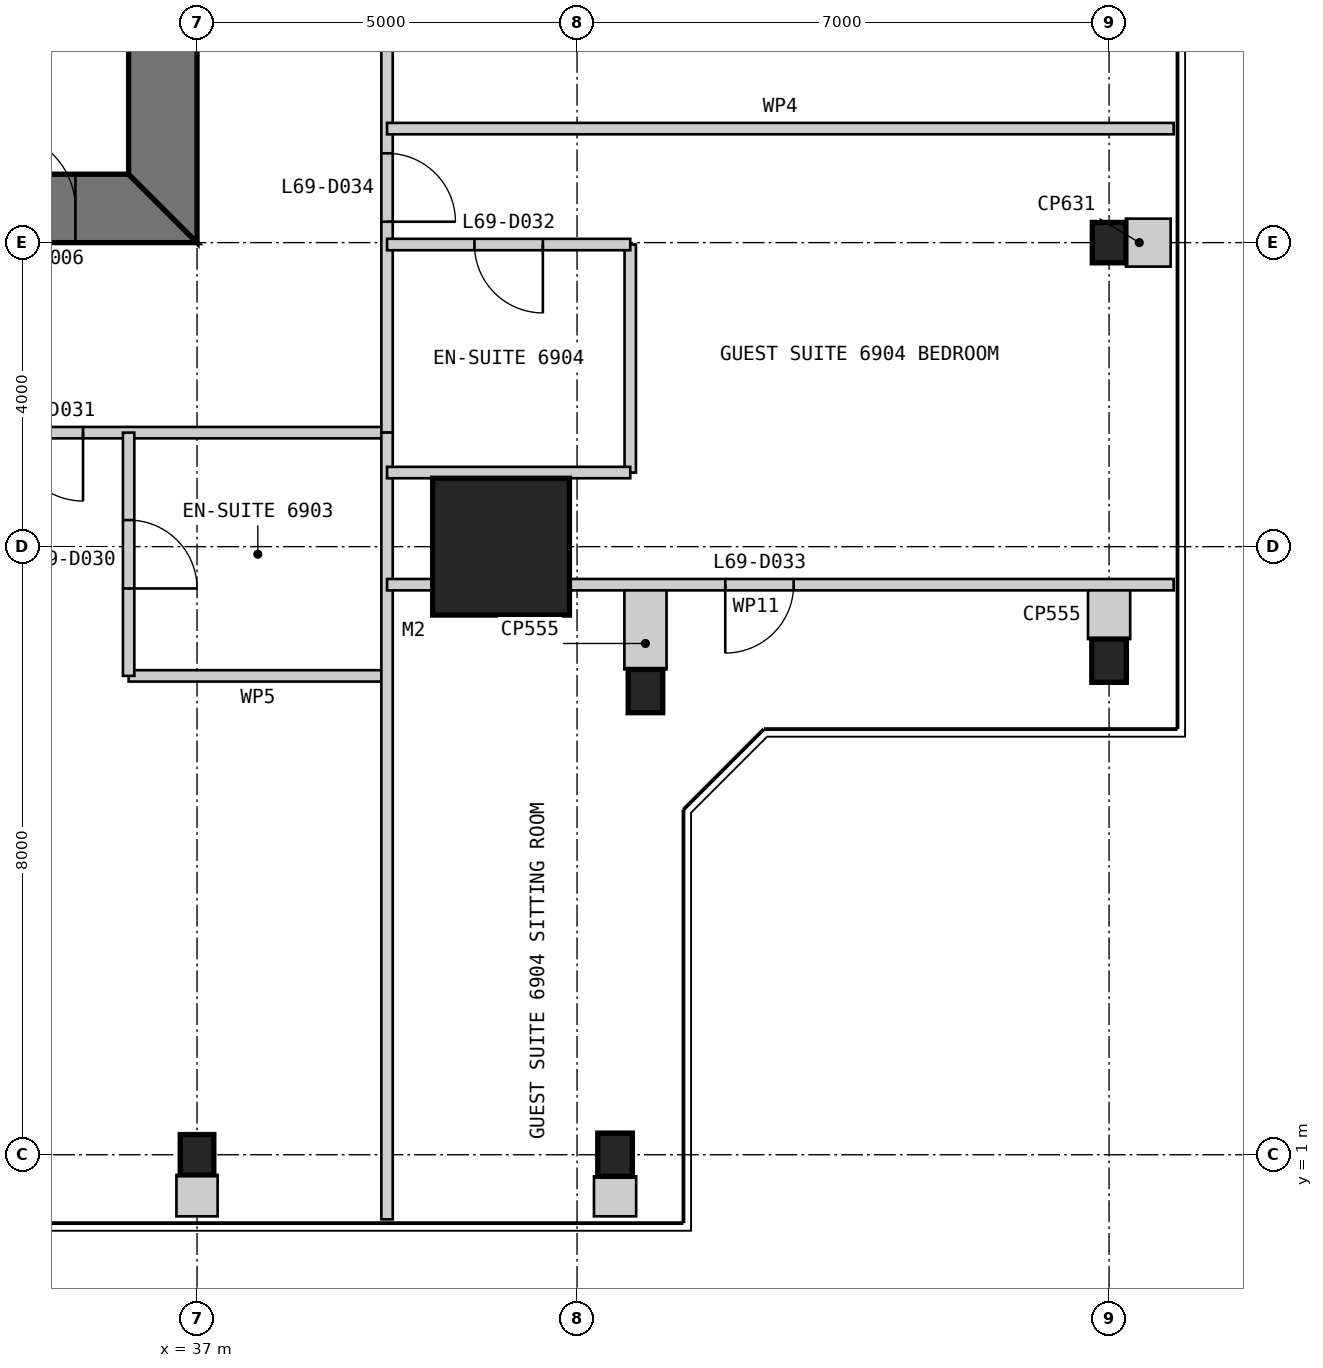
"""IFC4 building model, lengths in metres.
Left out: names, types, materials, properties, quantities, classifications, styles, units other than length and angle.
Written with IfcOpenShell. Run it as: python <this file> out.ifc"""

import sys

from ifc_helpers import new_model, si_unit, direction, frame, frame_2d, origin, origin_2d, place, context, subcontext, project, spatial, polyline, rectangle, i_section, outline, extrude, element, fill, save


model = new_model("IFC4")
c1 = context("Model", 3, precision=1e-05, world=origin(), true_north=direction((0.0, 1.0)))
c2 = subcontext(c1, "Body", "Model", "MODEL_VIEW")
j1 = project(units=[si_unit("LENGTHUNIT", "METRE"), si_unit("PLANEANGLEUNIT", "RADIAN")], contexts=[c1])
p1 = place(None, origin())
s1 = spatial("IfcSite", under=j1, at=p1, CompositionType="ELEMENT")
p2 = place(p1, origin())
s2 = spatial("IfcBuilding", under=s1, at=p2, CompositionType="ELEMENT")
p3 = place(p2, frame((0.0, 0.0, 286.6)))
s3 = spatial("IfcBuildingStorey", under=s2, at=p3, CompositionType="ELEMENT", Elevation=286.6)
p4 = place(p3, frame((41.0, 9.0, 0.0), z_axis=(0.0, 0.0, 1.0), x_axis=(1.0, 0.0, 0.0)))
e1 = element("IfcColumn", 1, at=p4, inside=s3, PredefinedType="COLUMN", context=c2, shape_type="SweptSolid", body=[
    extrude(rectangle(XDim=1.8, YDim=1.8, at=origin_2d()), origin(), (0.0, 0.0, 1.0), 3.4),
])
p5 = place(p3, frame((37.0, 1.0, 0.0), z_axis=(0.0, 0.0, 1.0), x_axis=(1.0, 0.0, 0.0)))
e2 = element("IfcColumn", 2, at=p5, inside=s3, PredefinedType="COLUMN", context=c2, shape_type="SweptSolid", body=[
    extrude(i_section(OverallWidth=0.442, OverallDepth=0.531, WebThickness=0.066, FlangeThickness=0.106, at=origin_2d()), origin(), (0.0, 0.0, 1.0), 3.4),
])
for number, where, z_axis, x_axis in (
    (3, (42.5, 1.0, 0.0), (0.0, 0.0, 1.0), (1.0, 0.0, 0.0)),
    (4, (42.9, 7.1, 0.0), (0.0, 0.0, 1.0), (1.0, 0.0, 0.0)),
    (5, (49.0, 7.5, 0.0), (0.0, 0.0, 1.0), (1.0, 0.0, 0.0)),
):
    element("IfcColumn", number, at=place(p3, frame(where, z_axis=z_axis, x_axis=x_axis)), inside=s3, PredefinedType="COLUMN", context=c2, shape_type="SweptSolid", body=[
        extrude(i_section(OverallWidth=0.455, OverallDepth=0.569, WebThickness=0.078, FlangeThickness=0.125, at=origin_2d()), origin(), (0.0, 0.0, 1.0), 3.4),
    ])
p6 = place(p3, frame((49.0, 13.0, 0.0), z_axis=(0.0, 0.0, 1.0), x_axis=(1.0, 0.0, 0.0)))
e6 = element("IfcColumn", 6, at=p6, inside=s3, PredefinedType="COLUMN", context=c2, shape_type="SweptSolid", body=[
    extrude(i_section(OverallWidth=0.442, OverallDepth=0.531, WebThickness=0.066, FlangeThickness=0.106, at=origin_2d()), origin(), (0.0, 0.0, 1.0), 3.4),
])
p7 = place(p3, frame((13.0, 13.45, 0.0), z_axis=(0.0, 0.0, 1.0), x_axis=(1.0, 0.0, 0.0)))
e7 = element("IfcWall", 7, at=p7, inside=s3, PredefinedType="SHEAR", context=c2, shape_type="SweptSolid", body=[
    extrude(outline(polyline([(0.0, -0.45), (24.0, -0.45), (23.1, 0.45), (0.9, 0.45), (0.0, -0.45)])), origin(), (0.0, 0.0, 1.0), 3.4),
])
p8 = place(p7, frame((4.9, 0.0, 0.0)))
e8 = element("IfcOpeningElement", 8, at=p8, cuts=e7, PredefinedType="OPENING", context=c2, shape_type="SweptSolid", body=[
    extrude(rectangle(XDim=1.0, YDim=2.2, at=frame_2d((0.5, 1.1))), frame((0.0, 0.46, 0.0), z_axis=(0.0, -1.0, 0.0), x_axis=(1.0, 0.0, 0.0)), (0.0, 0.0, 1.0), 0.92),
])
p9 = place(p7, frame((8.9, 0.0, 0.0)))
e9 = element("IfcOpeningElement", 9, at=p9, cuts=e7, PredefinedType="OPENING", context=c2, shape_type="SweptSolid", body=[
    extrude(rectangle(XDim=1.1, YDim=2.2, at=frame_2d((0.55, 1.1))), frame((0.0, 0.46, 0.0), z_axis=(0.0, -1.0, 0.0), x_axis=(1.0, 0.0, 0.0)), (0.0, 0.0, 1.0), 0.92),
])
p10 = place(p7, frame((15.05, 0.0, 0.0)))
e10 = element("IfcOpeningElement", 10, at=p10, cuts=e7, PredefinedType="OPENING", context=c2, shape_type="SweptSolid", body=[
    extrude(rectangle(XDim=0.9, YDim=2.2, at=frame_2d((0.45, 1.1))), frame((0.0, 0.46, 0.0), z_axis=(0.0, -1.0, 0.0), x_axis=(1.0, 0.0, 0.0)), (0.0, 0.0, 1.0), 0.92),
])
p11 = place(p7, frame((17.9, 0.0, 0.0)))
e11 = element("IfcOpeningElement", 11, at=p11, cuts=e7, PredefinedType="OPENING", context=c2, shape_type="SweptSolid", body=[
    extrude(rectangle(XDim=1.0, YDim=2.2, at=frame_2d((0.5, 1.1))), frame((0.0, 0.46, 0.0), z_axis=(0.0, -1.0, 0.0), x_axis=(1.0, 0.0, 0.0)), (0.0, 0.0, 1.0), 0.92),
])
p12 = place(p7, frame((21.4, 0.0, 0.0)))
e12 = element("IfcOpeningElement", 12, at=p12, cuts=e7, PredefinedType="OPENING", context=c2, shape_type="SweptSolid", body=[
    extrude(rectangle(XDim=1.0, YDim=2.2, at=frame_2d((0.5, 1.1))), frame((0.0, 0.46, 0.0), z_axis=(0.0, -1.0, 0.0), x_axis=(1.0, 0.0, 0.0)), (0.0, 0.0, 1.0), 0.92),
])
p13 = place(p3, frame((36.55, 13.9, 0.0), z_axis=(0.0, 0.0, 1.0), x_axis=(0.0, 1.0, 0.0)))
e13 = element("IfcWall", 13, at=p13, inside=s3, PredefinedType="SHEAR", context=c2, shape_type="SweptSolid", body=[
    extrude(outline(polyline([(-0.9, -0.45), (23.1, -0.45), (22.2, 0.45), (0.0, 0.45), (-0.9, -0.45)])), origin(), (0.0, 0.0, 1.0), 3.4),
])
p14 = place(p13, frame((20.2, 0.0, 0.0)))
e14 = element("IfcOpeningElement", 14, at=p14, cuts=e13, PredefinedType="OPENING", context=c2, shape_type="SweptSolid", body=[
    extrude(rectangle(XDim=1.0, YDim=2.2, at=frame_2d((0.5, 1.1))), frame((0.0, 0.46, 0.0), z_axis=(0.0, -1.0, 0.0), x_axis=(1.0, 0.0, 0.0)), (0.0, 0.0, 1.0), 0.92),
])
p15 = place(p13, frame((17.25, 0.0, 0.0)))
e15 = element("IfcOpeningElement", 15, at=p15, cuts=e13, PredefinedType="OPENING", context=c2, shape_type="SweptSolid", body=[
    extrude(rectangle(XDim=0.9, YDim=2.2, at=frame_2d((0.45, 1.1))), frame((0.0, 0.46, 0.0), z_axis=(0.0, -1.0, 0.0), x_axis=(1.0, 0.0, 0.0)), (0.0, 0.0, 1.0), 0.92),
])
p16 = place(p3, frame((10.5, 10.5, 0.0), z_axis=(0.0, 0.0, 1.0), x_axis=(1.0, 0.0, 0.0)))
e16 = element("IfcWall", 16, at=p16, inside=s3, PredefinedType="PARTITIONING", context=c2, shape_type="SweptSolid", body=[
    extrude(rectangle(XDim=29.0, YDim=0.15, at=frame_2d((14.5, 0.0))), origin(), (0.0, 0.0, 1.0), 3.25),
])
p17 = place(p16, frame((1.85, 0.0, 0.0)))
e17 = element("IfcOpeningElement", 17, at=p17, cuts=e16, PredefinedType="OPENING", context=c2, shape_type="SweptSolid", body=[
    extrude(rectangle(XDim=0.9, YDim=2.1, at=frame_2d((0.45, 1.05))), frame((0.0, 0.085, 0.0), z_axis=(0.0, -1.0, 0.0), x_axis=(1.0, 0.0, 0.0)), (0.0, 0.0, 1.0), 0.17),
])
p18 = place(p16, frame((11.5, 0.0, 0.0)))
e18 = element("IfcOpeningElement", 18, at=p18, cuts=e16, PredefinedType="OPENING", context=c2, shape_type="SweptSolid", body=[
    extrude(rectangle(XDim=0.9, YDim=2.1, at=frame_2d((0.45, 1.05))), frame((0.0, 0.085, 0.0), z_axis=(0.0, -1.0, 0.0), x_axis=(1.0, 0.0, 0.0)), (0.0, 0.0, 1.0), 0.17),
])
p19 = place(p16, frame((24.1, 0.0, 0.0)))
e19 = element("IfcOpeningElement", 19, at=p19, cuts=e16, PredefinedType="OPENING", context=c2, shape_type="SweptSolid", body=[
    extrude(rectangle(XDim=0.9, YDim=2.1, at=frame_2d((0.45, 1.05))), frame((0.0, 0.085, 0.0), z_axis=(0.0, -1.0, 0.0), x_axis=(1.0, 0.0, 0.0)), (0.0, 0.0, 1.0), 0.17),
])
p20 = place(p3, frame((36.1, 7.3, 0.0), z_axis=(0.0, 0.0, 1.0), x_axis=(1.0, 0.0, 0.0)))
e20 = element("IfcWall", 20, at=p20, inside=s3, PredefinedType="PARTITIONING", context=c2, shape_type="SweptSolid", body=[
    extrude(rectangle(XDim=3.4, YDim=0.15, at=frame_2d((1.7, 0.0))), origin(), (0.0, 0.0, 1.0), 3.25),
])
p21 = place(p3, frame((36.1, 7.3, 0.0), z_axis=(0.0, 0.0, 1.0), x_axis=(0.0, 1.0, 0.0)))
e21 = element("IfcWall", 21, at=p21, inside=s3, PredefinedType="PARTITIONING", context=c2, shape_type="SweptSolid", body=[
    extrude(rectangle(XDim=3.2, YDim=0.15, at=frame_2d((1.6, 0.0))), origin(), (0.0, 0.0, 1.0), 3.25),
])
p22 = place(p21, frame((1.15, 0.0, 0.0)))
e22 = element("IfcOpeningElement", 22, at=p22, cuts=e21, PredefinedType="OPENING", context=c2, shape_type="SweptSolid", body=[
    extrude(rectangle(XDim=0.9, YDim=2.1, at=frame_2d((0.45, 1.05))), frame((0.0, 0.085, 0.0), z_axis=(0.0, -1.0, 0.0), x_axis=(1.0, 0.0, 0.0)), (0.0, 0.0, 1.0), 0.17),
])
p23 = place(p3, frame((39.5, 10.5, 0.0), z_axis=(0.0, 0.0, 1.0), x_axis=(0.0, 1.0, 0.0)))
e23 = element("IfcWall", 23, at=p23, inside=s3, PredefinedType="PARTITIONING", context=c2, shape_type="SweptSolid", body=[
    extrude(rectangle(XDim=29.0, YDim=0.15, at=frame_2d((14.5, 0.0))), origin(), (0.0, 0.0, 1.0), 3.25),
])
p24 = place(p23, frame((2.775, 0.0, 0.0)))
e24 = element("IfcOpeningElement", 24, at=p24, cuts=e23, PredefinedType="OPENING", context=c2, shape_type="SweptSolid", body=[
    extrude(rectangle(XDim=0.9, YDim=2.1, at=frame_2d((0.45, 1.05))), frame((0.0, 0.085, 0.0), z_axis=(0.0, -1.0, 0.0), x_axis=(1.0, 0.0, 0.0)), (0.0, 0.0, 1.0), 0.17),
])
p25 = place(p23, frame((11.1, 0.0, 0.0)))
e25 = element("IfcOpeningElement", 25, at=p25, cuts=e23, PredefinedType="OPENING", context=c2, shape_type="SweptSolid", body=[
    extrude(rectangle(XDim=0.9, YDim=2.1, at=frame_2d((0.45, 1.05))), frame((0.0, 0.085, 0.0), z_axis=(0.0, -1.0, 0.0), x_axis=(1.0, 0.0, 0.0)), (0.0, 0.0, 1.0), 0.17),
])
p26 = place(p23, frame((17.2, 0.0, 0.0)))
e26 = element("IfcOpeningElement", 26, at=p26, cuts=e23, PredefinedType="OPENING", context=c2, shape_type="SweptSolid", body=[
    extrude(rectangle(XDim=1.0, YDim=2.1, at=frame_2d((0.5, 1.05))), frame((0.0, 0.085, 0.0), z_axis=(0.0, -1.0, 0.0), x_axis=(1.0, 0.0, 0.0)), (0.0, 0.0, 1.0), 0.17),
])
p27 = place(p23, frame((24.5, 0.0, 0.0)))
e27 = element("IfcOpeningElement", 27, at=p27, cuts=e23, PredefinedType="OPENING", context=c2, shape_type="SweptSolid", body=[
    extrude(rectangle(XDim=0.9, YDim=2.1, at=frame_2d((0.45, 1.05))), frame((0.0, 0.085, 0.0), z_axis=(0.0, -1.0, 0.0), x_axis=(1.0, 0.0, 0.0)), (0.0, 0.0, 1.0), 0.17),
])
p28 = place(p3, frame((39.5, 0.15, 0.0), z_axis=(0.0, 0.0, 1.0), x_axis=(0.0, 1.0, 0.0)))
e28 = element("IfcWall", 28, at=p28, inside=s3, PredefinedType="PARTITIONING", context=c2, shape_type="SweptSolid", body=[
    extrude(rectangle(XDim=10.35, YDim=0.15, at=frame_2d((5.175, 0.0))), origin(), (0.0, 0.0, 1.0), 3.25),
])
p29 = place(p3, frame((42.7, 9.975, 0.0), z_axis=(0.0, 0.0, 1.0), x_axis=(0.0, 1.0, 0.0)))
e29 = element("IfcWall", 29, at=p29, inside=s3, PredefinedType="PARTITIONING", context=c2, shape_type="SweptSolid", body=[
    extrude(rectangle(XDim=3.0, YDim=0.15, at=frame_2d((1.5, 0.0))), origin(), (0.0, 0.0, 1.0), 3.25),
])
p30 = place(p3, frame((42.7, 12.975, 0.0), z_axis=(0.0, 0.0, 1.0), x_axis=(-1.0, 0.0, 0.0)))
e30 = element("IfcWall", 30, at=p30, inside=s3, PredefinedType="PARTITIONING", context=c2, shape_type="SweptSolid", body=[
    extrude(rectangle(XDim=3.2, YDim=0.15, at=frame_2d((1.6, 0.0))), origin(), (0.0, 0.0, 1.0), 2.404),
])
p31 = place(p30, frame((1.15, 0.0, 0.0)))
e31 = element("IfcOpeningElement", 31, at=p31, cuts=e30, PredefinedType="OPENING", context=c2, shape_type="SweptSolid", body=[
    extrude(rectangle(XDim=0.9, YDim=2.1, at=frame_2d((0.45, 1.05))), frame((0.0, 0.085, 0.0), z_axis=(0.0, -1.0, 0.0), x_axis=(1.0, 0.0, 0.0)), (0.0, 0.0, 1.0), 0.17),
])
p32 = place(p3, frame((42.7, 9.975, 0.0), z_axis=(0.0, 0.0, 1.0), x_axis=(-1.0, 0.0, 0.0)))
e32 = element("IfcWall", 32, at=p32, inside=s3, PredefinedType="PARTITIONING", context=c2, shape_type="SweptSolid", body=[
    extrude(rectangle(XDim=3.2, YDim=0.15, at=frame_2d((1.6, 0.0))), origin(), (0.0, 0.0, 1.0), 3.25),
])
p33 = place(p3, frame((49.85, 8.5, 0.0), z_axis=(0.0, 0.0, 1.0), x_axis=(-1.0, 0.0, 0.0)))
e33 = element("IfcWall", 33, at=p33, inside=s3, PredefinedType="PARTITIONING", context=c2, shape_type="SweptSolid", body=[
    extrude(rectangle(XDim=10.35, YDim=0.15, at=frame_2d((5.175, 0.0))), origin(), (0.0, 0.0, 1.0), 3.25),
])
p34 = place(p33, frame((5.0, 0.0, 0.0)))
e34 = element("IfcOpeningElement", 34, at=p34, cuts=e33, PredefinedType="OPENING", context=c2, shape_type="SweptSolid", body=[
    extrude(rectangle(XDim=0.9, YDim=2.1, at=frame_2d((0.45, 1.05))), frame((0.0, 0.085, 0.0), z_axis=(0.0, -1.0, 0.0), x_axis=(1.0, 0.0, 0.0)), (0.0, 0.0, 1.0), 0.17),
])
p35 = place(p3, frame((49.85, 14.5, 0.0), z_axis=(0.0, 0.0, 1.0), x_axis=(-1.0, 0.0, 0.0)))
e35 = element("IfcWall", 35, at=p35, inside=s3, PredefinedType="PARTITIONING", context=c2, shape_type="SweptSolid", body=[
    extrude(rectangle(XDim=10.35, YDim=0.15, at=frame_2d((5.175, 0.0))), origin(), (0.0, 0.0, 1.0), 3.25),
])
p36 = place(p3, frame((37.0, 0.19, 0.0), z_axis=(0.0, 0.0, 1.0), x_axis=(0.0, 1.0, 0.0)))
e36 = element("IfcWall", 36, at=p36, inside=s3, PredefinedType="PARTITIONING", context=c2, shape_type="SweptSolid", body=[
    extrude(rectangle(XDim=0.545, YDim=0.542, at=frame_2d((0.272, 0.0))), origin(), (0.0, 0.0, 1.0), 3.25),
])
p37 = place(p3, frame((42.5, 0.19, 0.0), z_axis=(0.0, 0.0, 1.0), x_axis=(0.0, 1.0, 0.0)))
e37 = element("IfcWall", 37, at=p37, inside=s3, PredefinedType="PARTITIONING", context=c2, shape_type="SweptSolid", body=[
    extrude(rectangle(XDim=0.526, YDim=0.555, at=frame_2d((0.263, 0.0))), origin(), (0.0, 0.0, 1.0), 3.25),
])
p38 = place(p3, frame((42.9, 8.425, 0.0), z_axis=(0.0, 0.0, 1.0), x_axis=(0.0, -1.0, 0.0)))
e38 = element("IfcWall", 38, at=p38, inside=s3, PredefinedType="PARTITIONING", context=c2, shape_type="SweptSolid", body=[
    extrude(rectangle(XDim=1.041, YDim=0.555, at=frame_2d((0.52, 0.0))), origin(), (0.0, 0.0, 1.0), 3.25),
])
p39 = place(p3, frame((49.0, 8.425, 0.0), z_axis=(0.0, 0.0, 1.0), x_axis=(0.0, -1.0, 0.0)))
e39 = element("IfcWall", 39, at=p39, inside=s3, PredefinedType="PARTITIONING", context=c2, shape_type="SweptSolid", body=[
    extrude(rectangle(XDim=0.641, YDim=0.555, at=frame_2d((0.32, 0.0))), origin(), (0.0, 0.0, 1.0), 2.338),
])
p40 = place(p3, frame((49.81, 13.0, 0.0), z_axis=(0.0, 0.0, 1.0), x_axis=(-1.0, 0.0, 0.0)))
e40 = element("IfcWall", 40, at=p40, inside=s3, PredefinedType="PARTITIONING", context=c2, shape_type="SweptSolid", body=[
    extrude(rectangle(XDim=0.589, YDim=0.631, at=frame_2d((0.294, 0.0))), origin(), (0.0, 0.0, 1.0), 3.25),
])
p41 = place(p12, origin())
e41 = element("IfcDoor", 41, at=p41, inside=s3, OperationType="SINGLE_SWING_LEFT", PredefinedType="DOOR", context=c2, shape_type="SweptSolid", body=[
    extrude(rectangle(XDim=1.0, YDim=2.2, at=frame_2d((0.5, 1.1))), frame((0.0, 0.025, 0.0), z_axis=(0.0, -1.0, 0.0), x_axis=(1.0, 0.0, 0.0)), (0.0, 0.0, 1.0), 0.05),
    extrude(outline(polyline([(0.0, 0.0), (0.04, 0.0), (0.04, 2.16), (0.96, 2.16), (0.96, 0.0), (1.0, 0.0), (1.0, 2.2), (0.0, 2.2), (0.0, 0.0)])), frame((0.0, 0.3, 0.0), z_axis=(0.0, -1.0, 0.0), x_axis=(1.0, 0.0, 0.0)), (0.0, 0.0, 1.0), 0.6),
])
fill(e12, e41)
p42 = place(p22, frame((0.9, 0.0, 0.0), z_axis=(0.0, 0.0, 1.0), x_axis=(-1.0, 0.0, 0.0)))
e42 = element("IfcDoor", 42, at=p42, inside=s3, OperationType="SINGLE_SWING_RIGHT", PredefinedType="DOOR", context=c2, shape_type="SweptSolid", body=[
    extrude(rectangle(XDim=0.9, YDim=2.1, at=frame_2d((0.45, 1.05))), frame((0.0, 0.025, 0.0), z_axis=(0.0, -1.0, 0.0), x_axis=(1.0, 0.0, 0.0)), (0.0, 0.0, 1.0), 0.05),
])
fill(e22, e42)
p43 = place(p19, frame((0.9, 0.0, 0.0), z_axis=(0.0, 0.0, 1.0), x_axis=(-1.0, 0.0, 0.0)))
e43 = element("IfcDoor", 43, at=p43, inside=s3, OperationType="SINGLE_SWING_LEFT", PredefinedType="DOOR", context=c2, shape_type="SweptSolid", body=[
    extrude(rectangle(XDim=0.9, YDim=2.1, at=frame_2d((0.45, 1.05))), frame((0.0, 0.025, 0.0), z_axis=(0.0, -1.0, 0.0), x_axis=(1.0, 0.0, 0.0)), (0.0, 0.0, 1.0), 0.05),
])
fill(e19, e43)
p44 = place(p31, origin())
e44 = element("IfcDoor", 44, at=p44, inside=s3, OperationType="SINGLE_SWING_LEFT", PredefinedType="DOOR", context=c2, shape_type="SweptSolid", body=[
    extrude(rectangle(XDim=0.9, YDim=2.1, at=frame_2d((0.45, 1.05))), frame((0.0, 0.025, 0.0), z_axis=(0.0, -1.0, 0.0), x_axis=(1.0, 0.0, 0.0)), (0.0, 0.0, 1.0), 0.05),
])
fill(e31, e44)
p45 = place(p34, origin())
e45 = element("IfcDoor", 45, at=p45, inside=s3, OperationType="SINGLE_SWING_RIGHT", PredefinedType="DOOR", context=c2, shape_type="SweptSolid", body=[
    extrude(rectangle(XDim=0.9, YDim=2.1, at=frame_2d((0.45, 1.05))), frame((0.0, 0.025, 0.0), z_axis=(0.0, -1.0, 0.0), x_axis=(1.0, 0.0, 0.0)), (0.0, 0.0, 1.0), 0.05),
])
fill(e34, e45)
p46 = place(p24, frame((0.9, 0.0, 0.0), z_axis=(0.0, 0.0, 1.0), x_axis=(-1.0, 0.0, 0.0)))
e46 = element("IfcDoor", 46, at=p46, inside=s3, OperationType="SINGLE_SWING_RIGHT", PredefinedType="DOOR", context=c2, shape_type="SweptSolid", body=[
    extrude(rectangle(XDim=0.9, YDim=2.1, at=frame_2d((0.45, 1.05))), frame((0.0, 0.025, 0.0), z_axis=(0.0, -1.0, 0.0), x_axis=(1.0, 0.0, 0.0)), (0.0, 0.0, 1.0), 0.05),
])
fill(e24, e46)
save(model, sys.argv[1])
